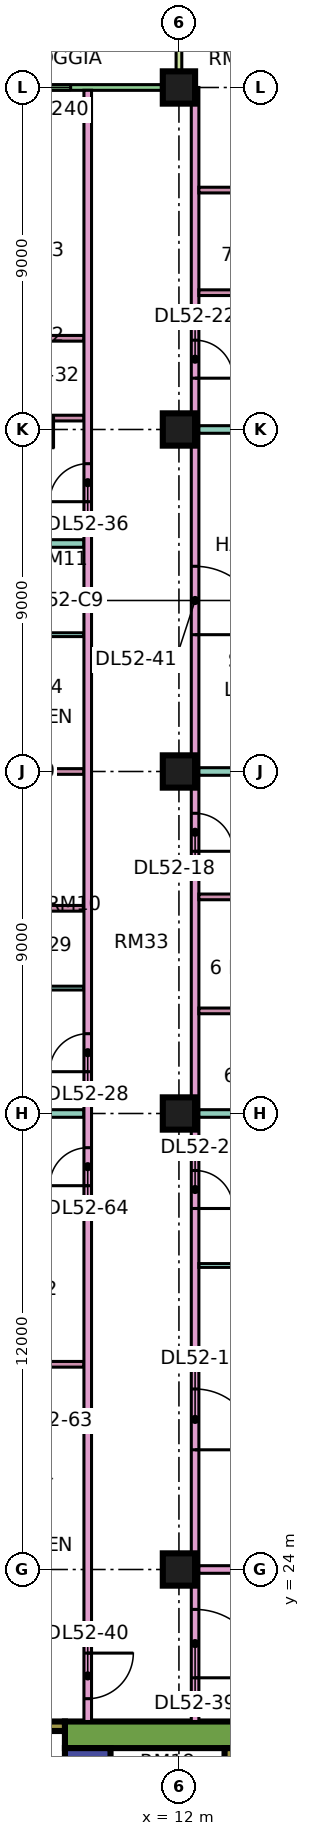
"""IFC4 building model, lengths in metres.
Left out: names, types, materials, properties, quantities, classifications, styles, units other than length and angle.
Written with IfcOpenShell. Run it as: python <this file> out.ifc"""

import sys

from ifc_helpers import new_model, si_unit, direction, frame, frame_2d, origin, origin_2d, place, context, subcontext, project, spatial, rectangle, extrude, element, fill, save


model = new_model("IFC4")
c1 = context("Model", 3, precision=1e-05, world=origin(), true_north=direction((0.0, 1.0)))
c2 = subcontext(c1, "Body", "Model", "MODEL_VIEW")
j1 = project(units=[si_unit("LENGTHUNIT", "METRE"), si_unit("PLANEANGLEUNIT", "RADIAN")], contexts=[c1])
p1 = place(None, origin())
s1 = spatial("IfcSite", under=j1, at=p1, CompositionType="ELEMENT")
p2 = place(p1, origin())
s2 = spatial("IfcBuilding", under=s1, at=p2, CompositionType="ELEMENT")
p3 = place(p2, frame((0.0, 0.0, 222.9)))
s3 = spatial("IfcBuildingStorey", under=s2, at=p3, CompositionType="ELEMENT", Elevation=222.9)
for number, where, z_axis, x_axis in (
    (1, (12.0, 24.0, 0.0), (0.0, 0.0, 1.0), (1.0, 0.0, 0.0)),
    (2, (12.0, 36.0, 0.0), (0.0, 0.0, 1.0), (1.0, 0.0, 0.0)),
    (3, (12.0, 45.0, 0.0), (0.0, 0.0, 1.0), (1.0, 0.0, 0.0)),
    (4, (12.0, 54.0, 0.0), (0.0, 0.0, 1.0), (1.0, 0.0, 0.0)),
    (5, (12.0, 63.0, 0.0), (0.0, 0.0, 1.0), (1.0, 0.0, 0.0)),
):
    element("IfcColumn", number, at=place(p3, frame(where, z_axis=z_axis, x_axis=x_axis)), inside=s3, PredefinedType="COLUMN", context=c2, shape_type="SweptSolid", body=[
        extrude(rectangle(XDim=0.85, YDim=0.85, at=origin_2d()), origin(), (0.0, 0.0, 1.0), 3.75),
    ])
p4 = place(p3, frame((9.0, 19.65, 0.0), z_axis=(0.0, 0.0, 1.0), x_axis=(1.0, 0.0, 0.0)))
e6 = element("IfcWall", 6, at=p4, inside=s3, PredefinedType="SHEAR", context=c2, shape_type="SweptSolid", body=[
    extrude(rectangle(XDim=25.0, YDim=0.7, at=frame_2d((12.5, 0.0))), origin(), (0.0, 0.0, 1.0), 3.75),
])
p5 = place(p4, frame((19.1, 0.0, 0.0)))
e7 = element("IfcOpeningElement", 7, at=p5, cuts=e6, PredefinedType="OPENING", context=c2, shape_type="SweptSolid", body=[
    extrude(rectangle(XDim=1.8, YDim=2.4, at=frame_2d((0.9, 1.2))), frame((0.0, 0.36, 0.0), z_axis=(0.0, -1.0, 0.0), x_axis=(1.0, 0.0, 0.0)), (0.0, 0.0, 1.0), 0.72),
])
p6 = place(p3, frame((9.6, 7.7, 0.0), z_axis=(0.0, 0.0, 1.0), x_axis=(0.0, 1.0, 0.0)))
e8 = element("IfcWall", 8, at=p6, inside=s3, PredefinedType="SHEAR", context=c2, shape_type="SweptSolid", body=[
    extrude(rectangle(XDim=11.6, YDim=1.2, at=frame_2d((5.8, 0.0))), origin(), (0.0, 0.0, 1.0), 3.75),
])
p7 = place(p6, frame((4.175, 0.0, 0.0)))
e9 = element("IfcOpeningElement", 9, at=p7, cuts=e8, PredefinedType="OPENING", context=c2, shape_type="SweptSolid", body=[
    extrude(rectangle(XDim=1.1, YDim=2.2, at=frame_2d((0.55, 1.1))), frame((0.0, 0.61, 0.0), z_axis=(0.0, -1.0, 0.0), x_axis=(1.0, 0.0, 0.0)), (0.0, 0.0, 1.0), 1.22),
])
p8 = place(p6, frame((6.675, 0.0, 0.0)))
e10 = element("IfcOpeningElement", 10, at=p8, cuts=e8, PredefinedType="OPENING", context=c2, shape_type="SweptSolid", body=[
    extrude(rectangle(XDim=1.1, YDim=2.2, at=frame_2d((0.55, 1.1))), frame((0.0, 0.61, 0.0), z_axis=(0.0, -1.0, 0.0), x_axis=(1.0, 0.0, 0.0)), (0.0, 0.0, 1.0), 1.22),
])
p9 = place(p6, frame((9.55, 0.0, 0.0)))
e11 = element("IfcOpeningElement", 11, at=p9, cuts=e8, PredefinedType="OPENING", context=c2, shape_type="SweptSolid", body=[
    extrude(rectangle(XDim=1.1, YDim=2.2, at=frame_2d((0.55, 1.1))), frame((0.0, 0.61, 0.0), z_axis=(0.0, -1.0, 0.0), x_axis=(1.0, 0.0, 0.0)), (0.0, 0.0, 1.0), 1.22),
])
p10 = place(p6, frame((1.85, 0.0, 0.0)))
e12 = element("IfcOpeningElement", 12, at=p10, cuts=e8, PredefinedType="OPENING", context=c2, shape_type="SweptSolid", body=[
    extrude(rectangle(XDim=0.9, YDim=2.1, at=frame_2d((0.45, 1.05))), frame((0.0, 0.61, 0.0), z_axis=(0.0, -1.0, 0.0), x_axis=(1.0, 0.0, 0.0)), (0.0, 0.0, 1.0), 1.22),
])
p11 = place(p3, frame((13.325, 7.7, 0.0), z_axis=(0.0, 0.0, 1.0), x_axis=(0.0, 1.0, 0.0)))
e13 = element("IfcWall", 13, at=p11, inside=s3, PredefinedType="SHEAR", context=c2, shape_type="SweptSolid", body=[
    extrude(rectangle(XDim=11.6, YDim=0.25, at=frame_2d((5.8, 0.0))), origin(), (0.0, 0.0, 1.0), 3.75),
])
p12 = place(p3, frame((2.1, 19.875, 0.0), z_axis=(0.0, 0.0, 1.0), x_axis=(1.0, 0.0, 0.0)))
e14 = element("IfcWall", 14, at=p12, inside=s3, PredefinedType="SHEAR", context=c2, shape_type="SweptSolid", body=[
    extrude(rectangle(XDim=6.9, YDim=0.25, at=frame_2d((3.45, 0.0))), origin(), (0.0, 0.0, 1.0), 3.75),
])
p13 = place(p12, frame((1.175, 0.0, 0.0)))
e15 = element("IfcOpeningElement", 15, at=p13, cuts=e14, PredefinedType="OPENING", context=c2, shape_type="SweptSolid", body=[
    extrude(rectangle(XDim=1.1, YDim=2.2, at=frame_2d((0.55, 1.1))), frame((0.0, 0.135, 0.0), z_axis=(0.0, -1.0, 0.0), x_axis=(1.0, 0.0, 0.0)), (0.0, 0.0, 1.0), 0.27),
])
p14 = place(p12, frame((4.6, 0.0, 0.0)))
e16 = element("IfcOpeningElement", 16, at=p14, cuts=e14, PredefinedType="OPENING", context=c2, shape_type="SweptSolid", body=[
    extrude(rectangle(XDim=1.2, YDim=2.2, at=frame_2d((0.6, 1.1))), frame((0.0, 0.135, 0.0), z_axis=(0.0, -1.0, 0.0), x_axis=(1.0, 0.0, 0.0)), (0.0, 0.0, 1.0), 0.27),
])
p15 = place(p3, frame((11.925, 63.0, 0.0), z_axis=(0.0, 0.0, 1.0), x_axis=(-1.0, 0.0, 0.0)))
e17 = element("IfcWall", 17, at=p15, inside=s3, PredefinedType="SOLIDWALL", context=c2, shape_type="SweptSolid", body=[
    extrude(rectangle(XDim=10.35, YDim=0.15, at=frame_2d((5.175, 0.0))), origin(), (0.0, 0.0, 1.0), 3.35),
])
p16 = place(p15, frame((2.775, 0.0, 0.45)))
e18 = element("IfcOpeningElement", 18, at=p16, cuts=e17, PredefinedType="OPENING", context=c2, shape_type="SweptSolid", body=[
    extrude(rectangle(XDim=1.8, YDim=2.4, at=frame_2d((0.9, 1.2))), frame((0.0, 0.085, 0.0), z_axis=(0.0, -1.0, 0.0), x_axis=(1.0, 0.0, 0.0)), (0.0, 0.0, 1.0), 0.17),
])
p17 = place(p15, frame((6.788, 0.0, 0.0)))
e19 = element("IfcOpeningElement", 19, at=p17, cuts=e17, PredefinedType="OPENING", context=c2, shape_type="SweptSolid", body=[
    extrude(rectangle(XDim=1.8, YDim=2.4, at=frame_2d((0.9, 1.2))), frame((0.0, 0.085, 0.0), z_axis=(0.0, -1.0, 0.0), x_axis=(1.0, 0.0, 0.0)), (0.0, 0.0, 1.0), 0.17),
])
p18 = place(p3, frame((12.0, 64.5, 0.0), z_axis=(0.0, 0.0, 1.0), x_axis=(0.0, -1.0, 0.0)))
e20 = element("IfcWall", 20, at=p18, inside=s3, PredefinedType="SOLIDWALL", context=c2, shape_type="SweptSolid", body=[
    extrude(rectangle(XDim=1.5, YDim=0.15, at=frame_2d((0.75, 0.0))), origin(), (0.0, 0.0, 1.0), 3.35),
])
p19 = place(p3, frame((-1.35, 22.4, 0.0), z_axis=(0.0, 0.0, 1.0), x_axis=(1.0, 0.0, 0.0)))
e21 = element("IfcWall", 21, at=p19, inside=s3, PredefinedType="PARTITIONING", context=c2, shape_type="SweptSolid", body=[
    extrude(rectangle(XDim=10.85, YDim=0.2, at=frame_2d((5.425, 0.0))), origin(), (0.0, 0.0, 1.0), 3.35),
])
p20 = place(p3, frame((0.0, 36.0, 0.0), z_axis=(0.0, 0.0, 1.0), x_axis=(1.0, 0.0, 0.0)))
e22 = element("IfcWall", 22, at=p20, inside=s3, PredefinedType="PARTITIONING", context=c2, shape_type="SweptSolid", body=[
    extrude(rectangle(XDim=9.5, YDim=0.2, at=frame_2d((4.75, 0.0))), origin(), (0.0, 0.0, 1.0), 3.35),
])
p21 = place(p3, frame((5.65, 51.0, 0.0), z_axis=(0.0, 0.0, 1.0), x_axis=(1.0, 0.0, 0.0)))
e23 = element("IfcWall", 23, at=p21, inside=s3, PredefinedType="PARTITIONING", context=c2, shape_type="SweptSolid", body=[
    extrude(rectangle(XDim=3.85, YDim=0.2, at=frame_2d((1.925, 0.0))), origin(), (0.0, 0.0, 1.0), 3.35),
])
for number, where, z_axis, x_axis in (
    (24, (6.675, 29.4, 0.0), (0.0, 0.0, 1.0), (1.0, 0.0, 0.0)),
    (25, (6.675, 33.3, 0.0), (0.0, 0.0, 1.0), (1.0, 0.0, 0.0)),
):
    element("IfcWall", number, at=place(p3, frame(where, z_axis=z_axis, x_axis=x_axis)), inside=s3, PredefinedType="PARTITIONING", context=c2, shape_type="SweptSolid", body=[
        extrude(rectangle(XDim=2.825, YDim=0.15, at=frame_2d((1.413, 0.0))), origin(), (0.0, 0.0, 1.0), 3.35),
    ])
p22 = place(p3, frame((6.675, 39.3, 0.0), z_axis=(0.0, 0.0, 1.0), x_axis=(1.0, 0.0, 0.0)))
e26 = element("IfcWall", 26, at=p22, inside=s3, PredefinedType="PARTITIONING", context=c2, shape_type="SweptSolid", body=[
    extrude(rectangle(XDim=2.825, YDim=0.1, at=frame_2d((1.413, 0.0))), origin(), (0.0, 0.0, 1.0), 3.35),
])
p23 = place(p22, frame((0.975, 0.0, 0.0)))
e27 = element("IfcOpeningElement", 27, at=p23, cuts=e26, PredefinedType="OPENING", context=c2, shape_type="SweptSolid", body=[
    extrude(rectangle(XDim=0.9, YDim=2.1, at=frame_2d((0.45, 1.05))), frame((0.0, 0.06, 0.0), z_axis=(0.0, -1.0, 0.0), x_axis=(1.0, 0.0, 0.0)), (0.0, 0.0, 1.0), 0.12),
])
for number, where, z_axis, x_axis in (
    (28, (6.675, 41.4, 0.0), (0.0, 0.0, 1.0), (1.0, 0.0, 0.0)),
    (29, (6.675, 45.0, 0.0), (0.0, 0.0, 1.0), (1.0, 0.0, 0.0)),
):
    element("IfcWall", number, at=place(p3, frame(where, z_axis=z_axis, x_axis=x_axis)), inside=s3, PredefinedType="PARTITIONING", context=c2, shape_type="SweptSolid", body=[
        extrude(rectangle(XDim=2.825, YDim=0.15, at=frame_2d((1.413, 0.0))), origin(), (0.0, 0.0, 1.0), 3.35),
    ])
p24 = place(p3, frame((6.675, 48.6, 0.0), z_axis=(0.0, 0.0, 1.0), x_axis=(1.0, 0.0, 0.0)))
e30 = element("IfcWall", 30, at=p24, inside=s3, PredefinedType="PARTITIONING", context=c2, shape_type="SweptSolid", body=[
    extrude(rectangle(XDim=2.825, YDim=0.1, at=frame_2d((1.413, 0.0))), origin(), (0.0, 0.0, 1.0), 3.35),
])
p25 = place(p3, frame((6.975, 54.3, 0.0), z_axis=(0.0, 0.0, 1.0), x_axis=(1.0, 0.0, 0.0)))
e31 = element("IfcWall", 31, at=p25, inside=s3, PredefinedType="PARTITIONING", context=c2, shape_type="SweptSolid", body=[
    extrude(rectangle(XDim=2.525, YDim=0.15, at=frame_2d((1.262, 0.0))), origin(), (0.0, 0.0, 1.0), 3.35),
])
p26 = place(p25, frame((0.925, 0.0, 0.0)))
e32 = element("IfcOpeningElement", 32, at=p26, cuts=e31, PredefinedType="OPENING", context=c2, shape_type="SweptSolid", body=[
    extrude(rectangle(XDim=0.8, YDim=2.1, at=frame_2d((0.4, 1.05))), frame((0.0, 0.085, 0.0), z_axis=(0.0, -1.0, 0.0), x_axis=(1.0, 0.0, 0.0)), (0.0, 0.0, 1.0), 0.17),
])
p27 = place(p3, frame((6.975, 56.4, 0.0), z_axis=(0.0, 0.0, 1.0), x_axis=(1.0, 0.0, 0.0)))
e33 = element("IfcWall", 33, at=p27, inside=s3, PredefinedType="PARTITIONING", context=c2, shape_type="SweptSolid", body=[
    extrude(rectangle(XDim=2.525, YDim=0.15, at=frame_2d((1.262, 0.0))), origin(), (0.0, 0.0, 1.0), 3.35),
])
p28 = place(p3, frame((9.6, 20.0, 0.0), z_axis=(0.0, 0.0, 1.0), x_axis=(0.0, 1.0, 0.0)))
e34 = element("IfcWall", 34, at=p28, inside=s3, PredefinedType="PARTITIONING", context=c2, shape_type="SweptSolid", body=[
    extrude(rectangle(XDim=42.926, YDim=0.2, at=frame_2d((21.463, 0.0))), origin(), (0.0, 0.0, 1.0), 3.35),
])
p29 = place(p28, frame((17.1, 0.0, 0.0)))
e35 = element("IfcOpeningElement", 35, at=p29, cuts=e34, PredefinedType="OPENING", context=c2, shape_type="SweptSolid", body=[
    extrude(rectangle(XDim=1.0, YDim=2.1, at=frame_2d((0.5, 1.05))), frame((0.0, 0.11, 0.0), z_axis=(0.0, -1.0, 0.0), x_axis=(1.0, 0.0, 0.0)), (0.0, 0.0, 1.0), 0.22),
])
p30 = place(p28, frame((32.1, 0.0, 0.0)))
e36 = element("IfcOpeningElement", 36, at=p30, cuts=e34, PredefinedType="OPENING", context=c2, shape_type="SweptSolid", body=[
    extrude(rectangle(XDim=1.0, YDim=2.1, at=frame_2d((0.5, 1.05))), frame((0.0, 0.11, 0.0), z_axis=(0.0, -1.0, 0.0), x_axis=(1.0, 0.0, 0.0)), (0.0, 0.0, 1.0), 0.22),
])
p31 = place(p28, frame((0.6, 0.0, 0.0)))
e37 = element("IfcOpeningElement", 37, at=p31, cuts=e34, PredefinedType="OPENING", context=c2, shape_type="SweptSolid", body=[
    extrude(rectangle(XDim=1.2, YDim=2.1, at=frame_2d((0.6, 1.05))), frame((0.0, 0.11, 0.0), z_axis=(0.0, -1.0, 0.0), x_axis=(1.0, 0.0, 0.0)), (0.0, 0.0, 1.0), 0.22),
])
p32 = place(p28, frame((14.1, 0.0, 0.0)))
e38 = element("IfcOpeningElement", 38, at=p32, cuts=e34, PredefinedType="OPENING", context=c2, shape_type="SweptSolid", body=[
    extrude(rectangle(XDim=1.0, YDim=2.1, at=frame_2d((0.5, 1.05))), frame((0.0, 0.11, 0.0), z_axis=(0.0, -1.0, 0.0), x_axis=(1.0, 0.0, 0.0)), (0.0, 0.0, 1.0), 0.22),
])
p33 = place(p3, frame((12.425, 20.0, 0.0), z_axis=(0.0, 0.0, 1.0), x_axis=(0.0, 1.0, 0.0)))
e39 = element("IfcWall", 39, at=p33, inside=s3, PredefinedType="PARTITIONING", context=c2, shape_type="SweptSolid", body=[
    extrude(rectangle(XDim=43.0, YDim=0.2, at=frame_2d((21.5, 0.0))), origin(), (0.0, 0.0, 1.0), 3.35),
])
p34 = place(p33, frame((7.15, 0.0, 0.0)))
e40 = element("IfcOpeningElement", 40, at=p34, cuts=e39, PredefinedType="OPENING", context=c2, shape_type="SweptSolid", body=[
    extrude(rectangle(XDim=1.6, YDim=2.1, at=frame_2d((0.8, 1.05))), frame((0.0, 0.11, 0.0), z_axis=(0.0, -1.0, 0.0), x_axis=(1.0, 0.0, 0.0)), (0.0, 0.0, 1.0), 0.22),
])
p35 = place(p33, frame((13.5, 0.0, 0.0)))
e41 = element("IfcOpeningElement", 41, at=p35, cuts=e39, PredefinedType="OPENING", context=c2, shape_type="SweptSolid", body=[
    extrude(rectangle(XDim=1.0, YDim=2.1, at=frame_2d((0.5, 1.05))), frame((0.0, 0.11, 0.0), z_axis=(0.0, -1.0, 0.0), x_axis=(1.0, 0.0, 0.0)), (0.0, 0.0, 1.0), 0.22),
])
p36 = place(p33, frame((22.9, 0.0, 0.0)))
e42 = element("IfcOpeningElement", 42, at=p36, cuts=e39, PredefinedType="OPENING", context=c2, shape_type="SweptSolid", body=[
    extrude(rectangle(XDim=1.0, YDim=2.1, at=frame_2d((0.5, 1.05))), frame((0.0, 0.11, 0.0), z_axis=(0.0, -1.0, 0.0), x_axis=(1.0, 0.0, 0.0)), (0.0, 0.0, 1.0), 0.22),
])
p37 = place(p33, frame((35.35, 0.0, 0.0)))
e43 = element("IfcOpeningElement", 43, at=p37, cuts=e39, PredefinedType="OPENING", context=c2, shape_type="SweptSolid", body=[
    extrude(rectangle(XDim=1.0, YDim=2.1, at=frame_2d((0.5, 1.05))), frame((0.0, 0.11, 0.0), z_axis=(0.0, -1.0, 0.0), x_axis=(1.0, 0.0, 0.0)), (0.0, 0.0, 1.0), 0.22),
])
p38 = place(p33, frame((1.15, 0.0, 0.0)))
e44 = element("IfcOpeningElement", 44, at=p38, cuts=e39, PredefinedType="OPENING", context=c2, shape_type="SweptSolid", body=[
    extrude(rectangle(XDim=1.8, YDim=2.1, at=frame_2d((0.9, 1.05))), frame((0.0, 0.11, 0.0), z_axis=(0.0, -1.0, 0.0), x_axis=(1.0, 0.0, 0.0)), (0.0, 0.0, 1.0), 0.22),
])
p39 = place(p33, frame((28.6, 0.0, 0.0)))
e45 = element("IfcOpeningElement", 45, at=p39, cuts=e39, PredefinedType="OPENING", context=c2, shape_type="SweptSolid", body=[
    extrude(rectangle(XDim=1.8, YDim=2.1, at=frame_2d((0.9, 1.05))), frame((0.0, 0.11, 0.0), z_axis=(0.0, -1.0, 0.0), x_axis=(1.0, 0.0, 0.0)), (0.0, 0.0, 1.0), 0.22),
])
p40 = place(p3, frame((12.525, 24.0, 0.0), z_axis=(0.0, 0.0, 1.0), x_axis=(1.0, 0.0, 0.0)))
e46 = element("IfcWall", 46, at=p40, inside=s3, PredefinedType="PARTITIONING", context=c2, shape_type="SweptSolid", body=[
    extrude(rectangle(XDim=8.975, YDim=0.2, at=frame_2d((4.488, 0.0))), origin(), (0.0, 0.0, 1.0), 3.35),
])
p41 = place(p3, frame((12.525, 32.0, 0.0), z_axis=(0.0, 0.0, 1.0), x_axis=(1.0, 0.0, 0.0)))
e47 = element("IfcWall", 47, at=p41, inside=s3, PredefinedType="PARTITIONING", context=c2, shape_type="SweptSolid", body=[
    extrude(rectangle(XDim=8.975, YDim=0.1, at=frame_2d((4.488, 0.0))), origin(), (0.0, 0.0, 1.0), 3.35),
])
p42 = place(p3, frame((12.525, 36.0, 0.0), z_axis=(0.0, 0.0, 1.0), x_axis=(1.0, 0.0, 0.0)))
e48 = element("IfcWall", 48, at=p42, inside=s3, PredefinedType="PARTITIONING", context=c2, shape_type="SweptSolid", body=[
    extrude(rectangle(XDim=11.475, YDim=0.2, at=frame_2d((5.738, 0.0))), origin(), (0.0, 0.0, 1.0), 3.35),
])
p43 = place(p3, frame((12.525, 38.7, 0.0), z_axis=(0.0, 0.0, 1.0), x_axis=(1.0, 0.0, 0.0)))
e49 = element("IfcWall", 49, at=p43, inside=s3, PredefinedType="PARTITIONING", context=c2, shape_type="SweptSolid", body=[
    extrude(rectangle(XDim=4.025, YDim=0.15, at=frame_2d((2.013, 0.0))), origin(), (0.0, 0.0, 1.0), 3.35),
])
p44 = place(p3, frame((12.525, 41.7, 0.0), z_axis=(0.0, 0.0, 1.0), x_axis=(1.0, 0.0, 0.0)))
e50 = element("IfcWall", 50, at=p44, inside=s3, PredefinedType="PARTITIONING", context=c2, shape_type="SweptSolid", body=[
    extrude(rectangle(XDim=4.025, YDim=0.15, at=frame_2d((2.013, 0.0))), origin(), (0.0, 0.0, 1.0), 3.35),
])
p45 = place(p44, frame((1.55, 0.0, 0.0)))
e51 = element("IfcOpeningElement", 51, at=p45, cuts=e50, PredefinedType="OPENING", context=c2, shape_type="SweptSolid", body=[
    extrude(rectangle(XDim=0.8, YDim=2.1, at=frame_2d((0.4, 1.05))), frame((0.0, 0.085, 0.0), z_axis=(0.0, -1.0, 0.0), x_axis=(1.0, 0.0, 0.0)), (0.0, 0.0, 1.0), 0.17),
])
p46 = place(p3, frame((12.525, 45.0, 0.0), z_axis=(0.0, 0.0, 1.0), x_axis=(1.0, 0.0, 0.0)))
e52 = element("IfcWall", 52, at=p46, inside=s3, PredefinedType="PARTITIONING", context=c2, shape_type="SweptSolid", body=[
    extrude(rectangle(XDim=11.475, YDim=0.2, at=frame_2d((5.738, 0.0))), origin(), (0.0, 0.0, 1.0), 3.35),
])
p47 = place(p3, frame((12.525, 54.0, 0.0), z_axis=(0.0, 0.0, 1.0), x_axis=(1.0, 0.0, 0.0)))
e53 = element("IfcWall", 53, at=p47, inside=s3, PredefinedType="PARTITIONING", context=c2, shape_type="SweptSolid", body=[
    extrude(rectangle(XDim=11.401, YDim=0.2, at=frame_2d((5.701, 0.0))), origin(), (0.0, 0.0, 1.0), 3.35),
])
for number, where, z_axis, x_axis in (
    (54, (12.525, 57.6, 0.0), (0.0, 0.0, 1.0), (1.0, 0.0, 0.0)),
    (55, (12.525, 60.3, 0.0), (0.0, 0.0, 1.0), (1.0, 0.0, 0.0)),
):
    element("IfcWall", number, at=place(p3, frame(where, z_axis=z_axis, x_axis=x_axis)), inside=s3, PredefinedType="PARTITIONING", context=c2, shape_type="SweptSolid", body=[
        extrude(rectangle(XDim=4.625, YDim=0.15, at=frame_2d((2.312, 0.0))), origin(), (0.0, 0.0, 1.0), 3.35),
    ])
p48 = place(p16, origin())
e56 = element("IfcWindow", 56, at=p48, inside=s3, PartitioningType="SINGLE_PANEL", PredefinedType="WINDOW", context=c2, shape_type="SweptSolid", body=[
    extrude(rectangle(XDim=1.8, YDim=2.4, at=frame_2d((0.9, 1.2))), frame((0.0, 0.03, 0.0), z_axis=(0.0, -1.0, 0.0), x_axis=(1.0, 0.0, 0.0)), (0.0, 0.0, 1.0), 0.06),
])
fill(e18, e56)
p49 = place(p34, frame((1.6, 0.0, 0.0), z_axis=(0.0, 0.0, 1.0), x_axis=(-1.0, 0.0, 0.0)))
e57 = element("IfcDoor", 57, at=p49, inside=s3, OperationType="DOUBLE_DOOR_SINGLE_SWING", PredefinedType="DOOR", context=c2, shape_type="SweptSolid", body=[
    extrude(rectangle(XDim=1.6, YDim=2.1, at=frame_2d((0.8, 1.05))), frame((0.0, 0.025, 0.0), z_axis=(0.0, -1.0, 0.0), x_axis=(1.0, 0.0, 0.0)), (0.0, 0.0, 1.0), 0.05),
])
fill(e40, e57)
p50 = place(p35, frame((1.0, 0.0, 0.0), z_axis=(0.0, 0.0, 1.0), x_axis=(-1.0, 0.0, 0.0)))
e58 = element("IfcDoor", 58, at=p50, inside=s3, OperationType="SINGLE_SWING_LEFT", PredefinedType="DOOR", context=c2, shape_type="SweptSolid", body=[
    extrude(rectangle(XDim=1.0, YDim=2.1, at=frame_2d((0.5, 1.05))), frame((0.0, 0.025, 0.0), z_axis=(0.0, -1.0, 0.0), x_axis=(1.0, 0.0, 0.0)), (0.0, 0.0, 1.0), 0.05),
])
fill(e41, e58)
p51 = place(p36, frame((1.0, 0.0, 0.0), z_axis=(0.0, 0.0, 1.0), x_axis=(-1.0, 0.0, 0.0)))
e59 = element("IfcDoor", 59, at=p51, inside=s3, OperationType="SINGLE_SWING_LEFT", PredefinedType="DOOR", context=c2, shape_type="SweptSolid", body=[
    extrude(rectangle(XDim=1.0, YDim=2.1, at=frame_2d((0.5, 1.05))), frame((0.0, 0.025, 0.0), z_axis=(0.0, -1.0, 0.0), x_axis=(1.0, 0.0, 0.0)), (0.0, 0.0, 1.0), 0.05),
])
fill(e42, e59)
p52 = place(p37, frame((1.0, 0.0, 0.0), z_axis=(0.0, 0.0, 1.0), x_axis=(-1.0, 0.0, 0.0)))
e60 = element("IfcDoor", 60, at=p52, inside=s3, OperationType="SINGLE_SWING_LEFT", PredefinedType="DOOR", context=c2, shape_type="SweptSolid", body=[
    extrude(rectangle(XDim=1.0, YDim=2.1, at=frame_2d((0.5, 1.05))), frame((0.0, 0.025, 0.0), z_axis=(0.0, -1.0, 0.0), x_axis=(1.0, 0.0, 0.0)), (0.0, 0.0, 1.0), 0.05),
])
fill(e43, e60)
p53 = place(p29, origin())
e61 = element("IfcDoor", 61, at=p53, inside=s3, OperationType="SINGLE_SWING_LEFT", PredefinedType="DOOR", context=c2, shape_type="SweptSolid", body=[
    extrude(rectangle(XDim=1.0, YDim=2.1, at=frame_2d((0.5, 1.05))), frame((0.0, 0.025, 0.0), z_axis=(0.0, -1.0, 0.0), x_axis=(1.0, 0.0, 0.0)), (0.0, 0.0, 1.0), 0.05),
])
fill(e35, e61)
p54 = place(p26, origin())
e62 = element("IfcDoor", 62, at=p54, inside=s3, OperationType="SINGLE_SWING_RIGHT", PredefinedType="DOOR", context=c2, shape_type="SweptSolid", body=[
    extrude(rectangle(XDim=0.8, YDim=2.1, at=frame_2d((0.4, 1.05))), frame((0.0, 0.025, 0.0), z_axis=(0.0, -1.0, 0.0), x_axis=(1.0, 0.0, 0.0)), (0.0, 0.0, 1.0), 0.05),
])
fill(e32, e62)
p55 = place(p30, origin())
e63 = element("IfcDoor", 63, at=p55, inside=s3, OperationType="SINGLE_SWING_LEFT", PredefinedType="DOOR", context=c2, shape_type="SweptSolid", body=[
    extrude(rectangle(XDim=1.0, YDim=2.1, at=frame_2d((0.5, 1.05))), frame((0.0, 0.025, 0.0), z_axis=(0.0, -1.0, 0.0), x_axis=(1.0, 0.0, 0.0)), (0.0, 0.0, 1.0), 0.05),
])
fill(e36, e63)
p56 = place(p38, frame((1.8, 0.0, 0.0), z_axis=(0.0, 0.0, 1.0), x_axis=(-1.0, 0.0, 0.0)))
e64 = element("IfcDoor", 64, at=p56, inside=s3, OperationType="DOUBLE_DOOR_SINGLE_SWING", PredefinedType="DOOR", context=c2, shape_type="SweptSolid", body=[
    extrude(rectangle(XDim=1.8, YDim=2.1, at=frame_2d((0.9, 1.05))), frame((0.0, 0.025, 0.0), z_axis=(0.0, -1.0, 0.0), x_axis=(1.0, 0.0, 0.0)), (0.0, 0.0, 1.0), 0.05),
])
fill(e44, e64)
p57 = place(p31, origin())
e65 = element("IfcDoor", 65, at=p57, inside=s3, OperationType="SINGLE_SWING_RIGHT", PredefinedType="DOOR", context=c2, shape_type="SweptSolid", body=[
    extrude(rectangle(XDim=1.2, YDim=2.1, at=frame_2d((0.6, 1.05))), frame((0.0, 0.025, 0.0), z_axis=(0.0, -1.0, 0.0), x_axis=(1.0, 0.0, 0.0)), (0.0, 0.0, 1.0), 0.05),
])
fill(e37, e65)
p58 = place(p39, frame((1.8, 0.0, 0.0), z_axis=(0.0, 0.0, 1.0), x_axis=(-1.0, 0.0, 0.0)))
e66 = element("IfcDoor", 66, at=p58, inside=s3, OperationType="DOUBLE_DOOR_SINGLE_SWING", PredefinedType="DOOR", context=c2, shape_type="SweptSolid", body=[
    extrude(rectangle(XDim=1.8, YDim=2.1, at=frame_2d((0.9, 1.05))), frame((0.0, 0.025, 0.0), z_axis=(0.0, -1.0, 0.0), x_axis=(1.0, 0.0, 0.0)), (0.0, 0.0, 1.0), 0.05),
])
fill(e45, e66)
p59 = place(p32, origin())
e67 = element("IfcDoor", 67, at=p59, inside=s3, OperationType="SINGLE_SWING_LEFT", PredefinedType="DOOR", context=c2, shape_type="SweptSolid", body=[
    extrude(rectangle(XDim=1.0, YDim=2.1, at=frame_2d((0.5, 1.05))), frame((0.0, 0.025, 0.0), z_axis=(0.0, -1.0, 0.0), x_axis=(1.0, 0.0, 0.0)), (0.0, 0.0, 1.0), 0.05),
])
fill(e38, e67)
save(model, sys.argv[1])
